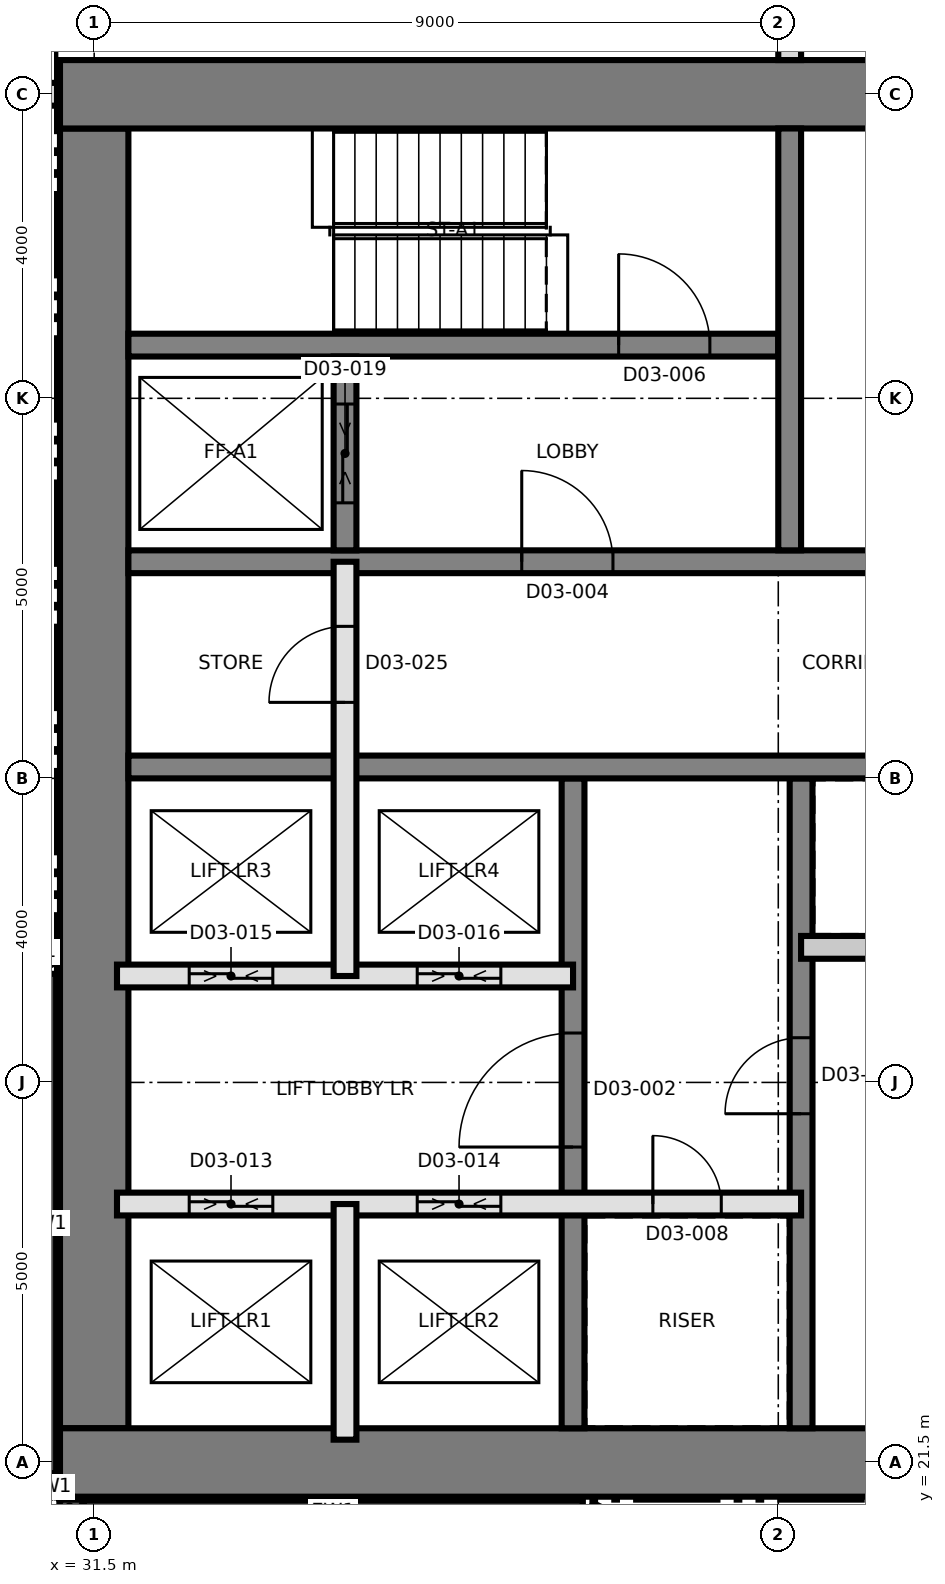
"""IFC4 building model, lengths in metres.
Left out: names, types, materials, properties, quantities, classifications, styles, units other than length and angle.
Written with IfcOpenShell. Run it as: python <this file> out.ifc"""

import sys

from ifc_helpers import new_model, si_unit, direction, frame, frame_2d, origin, place, context, subcontext, project, spatial, rectangle, extrude, element, fill, save


model = new_model("IFC4")
c1 = context("Model", 3, precision=1e-05, world=origin(), true_north=direction((0.0, 1.0)))
c2 = subcontext(c1, "Body", "Model", "MODEL_VIEW")
j1 = project(units=[si_unit("LENGTHUNIT", "METRE"), si_unit("PLANEANGLEUNIT", "RADIAN")], contexts=[c1])
p1 = place(None, origin())
s1 = spatial("IfcSite", under=j1, at=p1, CompositionType="ELEMENT")
p2 = place(p1, origin())
s2 = spatial("IfcBuilding", under=s1, at=p2, CompositionType="ELEMENT")
p3 = place(p2, frame((0.0, 0.0, 59.4)))
s3 = spatial("IfcBuildingStorey", under=s2, at=p3, CompositionType="ELEMENT", Elevation=59.4)
p4 = place(p3, frame((31.5, 21.95, 0.0), z_axis=(0.0, 0.0, 1.0), x_axis=(0.0, 1.0, 0.0)))
e1 = element("IfcWall", 1, at=p4, inside=s3, PredefinedType="SHEAR", context=c2, shape_type="SweptSolid", body=[
    extrude(rectangle(XDim=17.1, YDim=0.9, at=frame_2d((8.55, 0.0))), origin(), (0.0, 0.0, 1.0), 3.7),
])
p5 = place(p3, frame((31.05, 21.5, 0.0), z_axis=(0.0, 0.0, 1.0), x_axis=(1.0, 0.0, 0.0)))
e2 = element("IfcWall", 2, at=p5, inside=s3, PredefinedType="SHEAR", context=c2, shape_type="SweptSolid", body=[
    extrude(rectangle(XDim=27.0, YDim=0.9, at=frame_2d((13.5, 0.0))), origin(), (0.0, 0.0, 1.0), 3.7),
])
p6 = place(p3, frame((31.05, 39.5, 0.0), z_axis=(0.0, 0.0, 1.0), x_axis=(1.0, 0.0, 0.0)))
e3 = element("IfcWall", 3, at=p6, inside=s3, PredefinedType="SHEAR", context=c2, shape_type="SweptSolid", body=[
    extrude(rectangle(XDim=27.0, YDim=0.9, at=frame_2d((13.5, 0.0))), origin(), (0.0, 0.0, 1.0), 3.7),
])
p7 = place(p6, frame((10.65, 0.0, 0.0)))
e4 = element("IfcOpeningElement", 4, at=p7, cuts=e3, PredefinedType="OPENING", context=c2, shape_type="SweptSolid", body=[
    extrude(rectangle(XDim=1.2, YDim=2.1, at=frame_2d((0.6, 1.05))), frame((0.0, 0.46, 0.0), z_axis=(0.0, -1.0, 0.0), x_axis=(1.0, 0.0, 0.0)), (0.0, 0.0, 1.0), 0.92),
])
p8 = place(p3, frame((37.8, 21.95, 0.0), z_axis=(0.0, 0.0, 1.0), x_axis=(0.0, 1.0, 0.0)))
e5 = element("IfcWall", 5, at=p8, inside=s3, PredefinedType="SHEAR", context=c2, shape_type="SweptSolid", body=[
    extrude(rectangle(XDim=8.55, YDim=0.3, at=frame_2d((4.275, 0.0))), origin(), (0.0, 0.0, 1.0), 3.7),
])
p9 = place(p8, frame((3.7, 0.0, 0.0)))
e6 = element("IfcOpeningElement", 6, at=p9, cuts=e5, PredefinedType="OPENING", context=c2, shape_type="SweptSolid", body=[
    extrude(rectangle(XDim=1.5, YDim=2.1, at=frame_2d((0.75, 1.05))), frame((0.0, 0.16, 0.0), z_axis=(0.0, -1.0, 0.0), x_axis=(1.0, 0.0, 0.0)), (0.0, 0.0, 1.0), 0.32),
])
p10 = place(p3, frame((40.8, 21.95, 0.0), z_axis=(0.0, 0.0, 1.0), x_axis=(0.0, 1.0, 0.0)))
e7 = element("IfcWall", 7, at=p10, inside=s3, PredefinedType="SHEAR", context=c2, shape_type="SweptSolid", body=[
    extrude(rectangle(XDim=8.55, YDim=0.3, at=frame_2d((4.275, 0.0))), origin(), (0.0, 0.0, 1.0), 3.7),
])
p11 = place(p10, frame((4.138, 0.0, 0.0)))
e8 = element("IfcOpeningElement", 8, at=p11, cuts=e7, PredefinedType="OPENING", context=c2, shape_type="SweptSolid", body=[
    extrude(rectangle(XDim=1.0, YDim=2.1, at=frame_2d((0.5, 1.05))), frame((0.0, 0.16, 0.0), z_axis=(0.0, -1.0, 0.0), x_axis=(1.0, 0.0, 0.0)), (0.0, 0.0, 1.0), 0.32),
])
p12 = place(p3, frame((31.95, 30.65, 0.0), z_axis=(0.0, 0.0, 1.0), x_axis=(1.0, 0.0, 0.0)))
e9 = element("IfcWall", 9, at=p12, inside=s3, PredefinedType="SHEAR", context=c2, shape_type="SweptSolid", body=[
    extrude(rectangle(XDim=26.1, YDim=0.3, at=frame_2d((13.05, 0.0))), origin(), (0.0, 0.0, 1.0), 3.7),
])
p13 = place(p12, frame((24.55, 0.0, 0.0)))
e10 = element("IfcOpeningElement", 10, at=p13, cuts=e9, PredefinedType="OPENING", context=c2, shape_type="SweptSolid", body=[
    extrude(rectangle(XDim=1.0, YDim=2.1, at=frame_2d((0.5, 1.05))), frame((0.0, 0.16, 0.0), z_axis=(0.0, -1.0, 0.0), x_axis=(1.0, 0.0, 0.0)), (0.0, 0.0, 1.0), 0.32),
])
p14 = place(p12, frame((11.35, 0.0, 0.0)))
e11 = element("IfcOpeningElement", 11, at=p14, cuts=e9, PredefinedType="OPENING", context=c2, shape_type="SweptSolid", body=[
    extrude(rectangle(XDim=1.0, YDim=2.1, at=frame_2d((0.5, 1.05))), frame((0.0, 0.16, 0.0), z_axis=(0.0, -1.0, 0.0), x_axis=(1.0, 0.0, 0.0)), (0.0, 0.0, 1.0), 0.32),
])
p15 = place(p3, frame((31.95, 33.35, 0.0), z_axis=(0.0, 0.0, 1.0), x_axis=(1.0, 0.0, 0.0)))
e12 = element("IfcWall", 12, at=p15, inside=s3, PredefinedType="SHEAR", context=c2, shape_type="SweptSolid", body=[
    extrude(rectangle(XDim=26.1, YDim=0.3, at=frame_2d((13.05, 0.0))), origin(), (0.0, 0.0, 1.0), 3.7),
])
p16 = place(p15, frame((13.125, 0.0, 0.0)))
e13 = element("IfcOpeningElement", 13, at=p16, cuts=e12, PredefinedType="OPENING", context=c2, shape_type="SweptSolid", body=[
    extrude(rectangle(XDim=1.4, YDim=2.1, at=frame_2d((0.7, 1.05))), frame((0.0, 0.16, 0.0), z_axis=(0.0, -1.0, 0.0), x_axis=(1.0, 0.0, 0.0)), (0.0, 0.0, 1.0), 0.32),
])
p17 = place(p15, frame((5.175, 0.0, 0.0)))
e14 = element("IfcOpeningElement", 14, at=p17, cuts=e12, PredefinedType="OPENING", context=c2, shape_type="SweptSolid", body=[
    extrude(rectangle(XDim=1.2, YDim=2.1, at=frame_2d((0.6, 1.05))), frame((0.0, 0.16, 0.0), z_axis=(0.0, -1.0, 0.0), x_axis=(1.0, 0.0, 0.0)), (0.0, 0.0, 1.0), 0.32),
])
p18 = place(p15, frame((19.725, 0.0, 0.0)))
e15 = element("IfcOpeningElement", 15, at=p18, cuts=e12, PredefinedType="OPENING", context=c2, shape_type="SweptSolid", body=[
    extrude(rectangle(XDim=1.2, YDim=2.1, at=frame_2d((0.6, 1.05))), frame((0.0, 0.16, 0.0), z_axis=(0.0, -1.0, 0.0), x_axis=(1.0, 0.0, 0.0)), (0.0, 0.0, 1.0), 0.32),
])
p19 = place(p3, frame((31.95, 36.2, 0.0), z_axis=(0.0, 0.0, 1.0), x_axis=(1.0, 0.0, 0.0)))
e16 = element("IfcWall", 16, at=p19, inside=s3, PredefinedType="SHEAR", context=c2, shape_type="SweptSolid", body=[
    extrude(rectangle(XDim=8.55, YDim=0.3, at=frame_2d((4.275, 0.0))), origin(), (0.0, 0.0, 1.0), 3.7),
])
p20 = place(p19, frame((6.45, 0.0, 0.0)))
e17 = element("IfcOpeningElement", 17, at=p20, cuts=e16, PredefinedType="OPENING", context=c2, shape_type="SweptSolid", body=[
    extrude(rectangle(XDim=1.2, YDim=2.1, at=frame_2d((0.6, 1.05))), frame((0.0, 0.16, 0.0), z_axis=(0.0, -1.0, 0.0), x_axis=(1.0, 0.0, 0.0)), (0.0, 0.0, 1.0), 0.32),
])
p21 = place(p3, frame((40.65, 33.5, 0.0), z_axis=(0.0, 0.0, 1.0), x_axis=(0.0, 1.0, 0.0)))
e18 = element("IfcWall", 18, at=p21, inside=s3, PredefinedType="SHEAR", context=c2, shape_type="SweptSolid", body=[
    extrude(rectangle(XDim=5.55, YDim=0.3, at=frame_2d((2.775, 0.0))), origin(), (0.0, 0.0, 1.0), 3.7),
])
p22 = place(p3, frame((34.8, 33.5, 0.0), z_axis=(0.0, 0.0, 1.0), x_axis=(0.0, 1.0, 0.0)))
e19 = element("IfcWall", 19, at=p22, inside=s3, PredefinedType="SHEAR", context=c2, shape_type="SweptSolid", body=[
    extrude(rectangle(XDim=2.55, YDim=0.3, at=frame_2d((1.275, 0.0))), origin(), (0.0, 0.0, 1.0), 3.7),
])
p23 = place(p22, frame((0.625, 0.0, 0.0)))
e20 = element("IfcOpeningElement", 20, at=p23, cuts=e19, PredefinedType="OPENING", context=c2, shape_type="SweptSolid", body=[
    extrude(rectangle(XDim=1.3, YDim=2.4, at=frame_2d((0.65, 1.2))), frame((0.0, 0.16, 0.0), z_axis=(0.0, -1.0, 0.0), x_axis=(1.0, 0.0, 0.0)), (0.0, 0.0, 1.0), 0.32),
])
p24 = place(p3, frame((30.85, 27.929, 0.0), z_axis=(0.0, 0.0, 1.0), x_axis=(0.0, -1.0, 0.0)))
e21 = element("IfcWall", 21, at=p24, inside=s3, PredefinedType="SOLIDWALL", context=c2, shape_type="SweptSolid", body=[
    extrude(rectangle(XDim=6.569, YDim=0.3, at=frame_2d((3.285, 0.0))), origin(), (0.0, 0.0, 1.0), 3.4),
])
for number, where, z_axis, x_axis in (
    (22, (30.861, 21.302, 0.0), (0.0, 0.0, 1.0), (0.383, -0.924, 0.0)),
    (23, (31.048, 20.967, 0.0), (0.0, 0.0, 1.0), (0.924, -0.383, 0.0)),
):
    element("IfcWall", number, at=place(p3, frame(where, z_axis=z_axis, x_axis=x_axis)), inside=s3, PredefinedType="SOLIDWALL", context=c2, shape_type="SweptSolid", body=[
        extrude(rectangle(XDim=0.275, YDim=0.3, at=frame_2d((0.138, 0.0))), origin(), (0.0, 0.0, 1.0), 3.4),
    ])
p25 = place(p3, frame((31.36, 20.85, 0.0), z_axis=(0.0, 0.0, 1.0), x_axis=(1.0, 0.0, 0.0)))
e24 = element("IfcWall", 24, at=p25, inside=s3, PredefinedType="SOLIDWALL", context=c2, shape_type="SweptSolid", body=[
    extrude(rectangle(XDim=6.569, YDim=0.3, at=frame_2d((3.285, 0.0))), origin(), (0.0, 0.0, 1.0), 3.4),
])
for number, where, z_axis, x_axis in (
    (25, (37.995, 20.834, 0.0), (0.0, 0.0, 1.0), (0.897, -0.442, 0.0)),
    (26, (30.613, 28.444, 0.0), (0.0, 0.0, 1.0), (0.442, -0.897, 0.0)),
):
    element("IfcWall", number, at=place(p3, frame(where, z_axis=z_axis, x_axis=x_axis)), inside=s3, PredefinedType="SOLIDWALL", context=c2, shape_type="SweptSolid", body=[
        extrude(rectangle(XDim=0.501, YDim=0.3, at=frame_2d((0.25, 0.0))), origin(), (0.0, 0.0, 1.0), 3.4),
    ])
p26 = place(p3, frame((31.8, 24.9, 0.0), z_axis=(0.0, 0.0, 1.0), x_axis=(1.0, 0.0, 0.0)))
e27 = element("IfcWall", 27, at=p26, inside=s3, PredefinedType="SOLIDWALL", context=c2, shape_type="SweptSolid", body=[
    extrude(rectangle(XDim=9.0, YDim=0.3, at=frame_2d((4.5, 0.0))), origin(), (0.0, 0.0, 1.0), 3.4),
])
p27 = place(p26, frame((7.05, 0.0, 0.0)))
e28 = element("IfcOpeningElement", 28, at=p27, cuts=e27, PredefinedType="OPENING", context=c2, shape_type="SweptSolid", body=[
    extrude(rectangle(XDim=0.9, YDim=2.1, at=frame_2d((0.45, 1.05))), frame((0.0, 0.16, 0.0), z_axis=(0.0, -1.0, 0.0), x_axis=(1.0, 0.0, 0.0)), (0.0, 0.0, 1.0), 0.32),
])
p28 = place(p26, frame((0.95, 0.0, 0.0)))
e29 = element("IfcOpeningElement", 29, at=p28, cuts=e27, PredefinedType="OPENING", context=c2, shape_type="SweptSolid", body=[
    extrude(rectangle(XDim=1.1, YDim=2.4, at=frame_2d((0.55, 1.2))), frame((0.0, 0.16, 0.0), z_axis=(0.0, -1.0, 0.0), x_axis=(1.0, 0.0, 0.0)), (0.0, 0.0, 1.0), 0.32),
])
p29 = place(p26, frame((3.95, 0.0, 0.0)))
e30 = element("IfcOpeningElement", 30, at=p29, cuts=e27, PredefinedType="OPENING", context=c2, shape_type="SweptSolid", body=[
    extrude(rectangle(XDim=1.1, YDim=2.4, at=frame_2d((0.55, 1.2))), frame((0.0, 0.16, 0.0), z_axis=(0.0, -1.0, 0.0), x_axis=(1.0, 0.0, 0.0)), (0.0, 0.0, 1.0), 0.32),
])
p30 = place(p3, frame((31.8, 27.9, 0.0), z_axis=(0.0, 0.0, 1.0), x_axis=(1.0, 0.0, 0.0)))
e31 = element("IfcWall", 31, at=p30, inside=s3, PredefinedType="SOLIDWALL", context=c2, shape_type="SweptSolid", body=[
    extrude(rectangle(XDim=6.0, YDim=0.3, at=frame_2d((3.0, 0.0))), origin(), (0.0, 0.0, 1.0), 3.4),
])
p31 = place(p30, frame((0.95, 0.0, 0.0)))
e32 = element("IfcOpeningElement", 32, at=p31, cuts=e31, PredefinedType="OPENING", context=c2, shape_type="SweptSolid", body=[
    extrude(rectangle(XDim=1.1, YDim=2.4, at=frame_2d((0.55, 1.2))), frame((0.0, 0.16, 0.0), z_axis=(0.0, -1.0, 0.0), x_axis=(1.0, 0.0, 0.0)), (0.0, 0.0, 1.0), 0.32),
])
p32 = place(p30, frame((3.95, 0.0, 0.0)))
e33 = element("IfcOpeningElement", 33, at=p32, cuts=e31, PredefinedType="OPENING", context=c2, shape_type="SweptSolid", body=[
    extrude(rectangle(XDim=1.1, YDim=2.4, at=frame_2d((0.55, 1.2))), frame((0.0, 0.16, 0.0), z_axis=(0.0, -1.0, 0.0), x_axis=(1.0, 0.0, 0.0)), (0.0, 0.0, 1.0), 0.32),
])
p33 = place(p3, frame((40.8, 28.277, 0.0), z_axis=(0.0, 0.0, 1.0), x_axis=(1.0, 0.0, 0.0)))
e34 = element("IfcWall", 34, at=p33, inside=s3, PredefinedType="PARTITIONING", context=c2, shape_type="SweptSolid", body=[
    extrude(rectangle(XDim=6.0, YDim=0.3, at=frame_2d((3.0, 0.0))), origin(), (0.0, 0.0, 1.0), 3.4),
])
p34 = place(p3, frame((34.8, 21.8, 0.0), z_axis=(0.0, 0.0, 1.0), x_axis=(0.0, 1.0, 0.0)))
e35 = element("IfcWall", 35, at=p34, inside=s3, PredefinedType="SOLIDWALL", context=c2, shape_type="SweptSolid", body=[
    extrude(rectangle(XDim=3.1, YDim=0.3, at=frame_2d((1.55, 0.0))), origin(), (0.0, 0.0, 1.0), 3.4),
])
p35 = place(p3, frame((34.8, 27.9, 0.0), z_axis=(0.0, 0.0, 1.0), x_axis=(0.0, 1.0, 0.0)))
e36 = element("IfcWall", 36, at=p35, inside=s3, PredefinedType="SOLIDWALL", context=c2, shape_type="SweptSolid", body=[
    extrude(rectangle(XDim=5.45, YDim=0.3, at=frame_2d((2.725, 0.0))), origin(), (0.0, 0.0, 1.0), 3.4),
])
p36 = place(p35, frame((3.6, 0.0, 0.0)))
e37 = element("IfcOpeningElement", 37, at=p36, cuts=e36, PredefinedType="OPENING", context=c2, shape_type="SweptSolid", body=[
    extrude(rectangle(XDim=1.0, YDim=2.1, at=frame_2d((0.5, 1.05))), frame((0.0, 0.16, 0.0), z_axis=(0.0, -1.0, 0.0), x_axis=(1.0, 0.0, 0.0)), (0.0, 0.0, 1.0), 0.32),
])
p37 = place(p3, frame((29.705, 39.5, 0.0), z_axis=(0.0, 0.0, 1.0), x_axis=(1.0, 0.0, 0.0)))
e38 = element("IfcWall", 38, at=p37, inside=s3, PredefinedType="PARTITIONING", context=c2, shape_type="SweptSolid", body=[
    extrude(rectangle(XDim=1.325, YDim=0.3, at=frame_2d((0.663, 0.0))), origin(), (0.0, 0.0, 1.0), 3.4),
])
p38 = place(p3, frame((40.65, 39.95, 0.0), z_axis=(0.0, 0.0, 1.0), x_axis=(0.0, 1.0, 0.0)))
e39 = element("IfcWall", 39, at=p38, inside=s3, PredefinedType="PARTITIONING", context=c2, shape_type="SweptSolid", body=[
    extrude(rectangle(XDim=37.05, YDim=0.3, at=frame_2d((18.525, 0.0))), origin(), (0.0, 0.0, 1.0), 3.4),
])
p39 = place(p38, frame((1.9, 0.0, 0.0)))
e40 = element("IfcOpeningElement", 40, at=p39, cuts=e39, PredefinedType="OPENING", context=c2, shape_type="SweptSolid", body=[
    extrude(rectangle(XDim=1.0, YDim=2.4, at=frame_2d((0.5, 1.2))), frame((0.0, 0.16, 0.0), z_axis=(0.0, -1.0, 0.0), x_axis=(1.0, 0.0, 0.0)), (0.0, 0.0, 1.0), 0.32),
])
p40 = place(p38, frame((14.2, 0.0, 0.0)))
e41 = element("IfcOpeningElement", 41, at=p40, cuts=e39, PredefinedType="OPENING", context=c2, shape_type="SweptSolid", body=[
    extrude(rectangle(XDim=1.0, YDim=2.4, at=frame_2d((0.5, 1.2))), frame((0.0, 0.16, 0.0), z_axis=(0.0, -1.0, 0.0), x_axis=(1.0, 0.0, 0.0)), (0.0, 0.0, 1.0), 0.32),
])
p41 = place(p38, frame((21.05, 0.0, 0.0)))
e42 = element("IfcOpeningElement", 42, at=p41, cuts=e39, PredefinedType="OPENING", context=c2, shape_type="SweptSolid", body=[
    extrude(rectangle(XDim=1.0, YDim=2.4, at=frame_2d((0.5, 1.2))), frame((0.0, 0.16, 0.0), z_axis=(0.0, -1.0, 0.0), x_axis=(1.0, 0.0, 0.0)), (0.0, 0.0, 1.0), 0.32),
])
p42 = place(p9, origin())
e43 = element("IfcDoor", 43, at=p42, inside=s3, OperationType="SINGLE_SWING_LEFT", PredefinedType="DOOR", context=c2, shape_type="SweptSolid", body=[
    extrude(rectangle(XDim=1.5, YDim=2.1, at=frame_2d((0.75, 1.05))), frame((0.0, 0.025, 0.0), z_axis=(0.0, -1.0, 0.0), x_axis=(1.0, 0.0, 0.0)), (0.0, 0.0, 1.0), 0.05),
])
fill(e6, e43)
p43 = place(p17, origin())
e44 = element("IfcDoor", 44, at=p43, inside=s3, OperationType="SINGLE_SWING_LEFT", PredefinedType="DOOR", context=c2, shape_type="SweptSolid", body=[
    extrude(rectangle(XDim=1.2, YDim=2.1, at=frame_2d((0.6, 1.05))), frame((0.0, 0.025, 0.0), z_axis=(0.0, -1.0, 0.0), x_axis=(1.0, 0.0, 0.0)), (0.0, 0.0, 1.0), 0.05),
])
fill(e14, e44)
p44 = place(p20, origin())
e45 = element("IfcDoor", 45, at=p44, inside=s3, OperationType="SINGLE_SWING_RIGHT", PredefinedType="DOOR", context=c2, shape_type="SweptSolid", body=[
    extrude(rectangle(XDim=1.2, YDim=2.1, at=frame_2d((0.6, 1.05))), frame((0.0, 0.025, 0.0), z_axis=(0.0, -1.0, 0.0), x_axis=(1.0, 0.0, 0.0)), (0.0, 0.0, 1.0), 0.05),
])
fill(e17, e45)
p45 = place(p27, origin())
e46 = element("IfcDoor", 46, at=p45, inside=s3, OperationType="SINGLE_SWING_LEFT", PredefinedType="DOOR", context=c2, shape_type="SweptSolid", body=[
    extrude(rectangle(XDim=0.9, YDim=2.1, at=frame_2d((0.45, 1.05))), frame((0.0, 0.025, 0.0), z_axis=(0.0, -1.0, 0.0), x_axis=(1.0, 0.0, 0.0)), (0.0, 0.0, 1.0), 0.05),
])
fill(e28, e46)
p46 = place(p28, origin())
e47 = element("IfcDoor", 47, at=p46, inside=s3, OperationType="SLIDING_TO_LEFT", PredefinedType="DOOR", context=c2, shape_type="SweptSolid", body=[
    extrude(rectangle(XDim=1.1, YDim=2.4, at=frame_2d((0.55, 1.2))), frame((0.0, 0.025, 0.0), z_axis=(0.0, -1.0, 0.0), x_axis=(1.0, 0.0, 0.0)), (0.0, 0.0, 1.0), 0.05),
])
fill(e29, e47)
p47 = place(p29, origin())
e48 = element("IfcDoor", 48, at=p47, inside=s3, OperationType="SLIDING_TO_LEFT", PredefinedType="DOOR", context=c2, shape_type="SweptSolid", body=[
    extrude(rectangle(XDim=1.1, YDim=2.4, at=frame_2d((0.55, 1.2))), frame((0.0, 0.025, 0.0), z_axis=(0.0, -1.0, 0.0), x_axis=(1.0, 0.0, 0.0)), (0.0, 0.0, 1.0), 0.05),
])
fill(e30, e48)
p48 = place(p31, origin())
e49 = element("IfcDoor", 49, at=p48, inside=s3, OperationType="SLIDING_TO_LEFT", PredefinedType="DOOR", context=c2, shape_type="SweptSolid", body=[
    extrude(rectangle(XDim=1.1, YDim=2.4, at=frame_2d((0.55, 1.2))), frame((0.0, 0.025, 0.0), z_axis=(0.0, -1.0, 0.0), x_axis=(1.0, 0.0, 0.0)), (0.0, 0.0, 1.0), 0.05),
])
fill(e32, e49)
p49 = place(p32, origin())
e50 = element("IfcDoor", 50, at=p49, inside=s3, OperationType="SLIDING_TO_LEFT", PredefinedType="DOOR", context=c2, shape_type="SweptSolid", body=[
    extrude(rectangle(XDim=1.1, YDim=2.4, at=frame_2d((0.55, 1.2))), frame((0.0, 0.025, 0.0), z_axis=(0.0, -1.0, 0.0), x_axis=(1.0, 0.0, 0.0)), (0.0, 0.0, 1.0), 0.05),
])
fill(e33, e50)
p50 = place(p23, origin())
e51 = element("IfcDoor", 51, at=p50, inside=s3, OperationType="SLIDING_TO_LEFT", PredefinedType="DOOR", context=c2, shape_type="SweptSolid", body=[
    extrude(rectangle(XDim=1.3, YDim=2.4, at=frame_2d((0.65, 1.2))), frame((0.0, 0.025, 0.0), z_axis=(0.0, -1.0, 0.0), x_axis=(1.0, 0.0, 0.0)), (0.0, 0.0, 1.0), 0.05),
])
fill(e20, e51)
p51 = place(p11, origin())
e52 = element("IfcDoor", 52, at=p51, inside=s3, OperationType="SINGLE_SWING_RIGHT", PredefinedType="DOOR", context=c2, shape_type="SweptSolid", body=[
    extrude(rectangle(XDim=1.0, YDim=2.1, at=frame_2d((0.5, 1.05))), frame((0.0, 0.025, 0.0), z_axis=(0.0, -1.0, 0.0), x_axis=(1.0, 0.0, 0.0)), (0.0, 0.0, 1.0), 0.05),
])
fill(e8, e52)
p52 = place(p36, origin())
e53 = element("IfcDoor", 53, at=p52, inside=s3, OperationType="SINGLE_SWING_LEFT", PredefinedType="DOOR", context=c2, shape_type="SweptSolid", body=[
    extrude(rectangle(XDim=1.0, YDim=2.1, at=frame_2d((0.5, 1.05))), frame((0.0, 0.025, 0.0), z_axis=(0.0, -1.0, 0.0), x_axis=(1.0, 0.0, 0.0)), (0.0, 0.0, 1.0), 0.05),
])
fill(e37, e53)
save(model, sys.argv[1])
